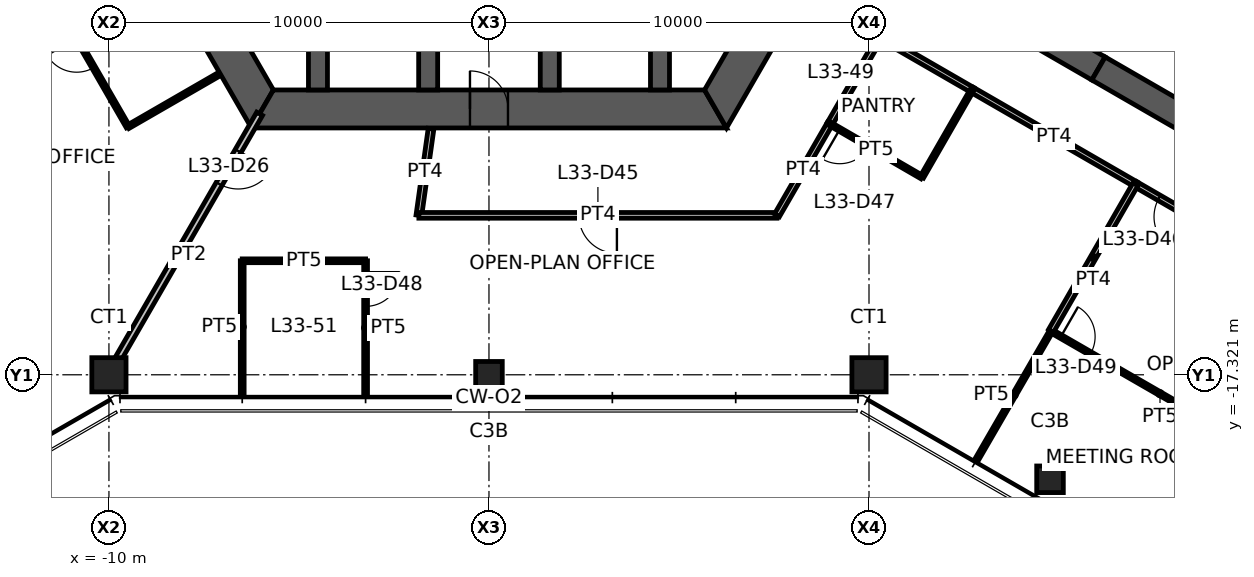
"""IFC4 building model, lengths in metres.
Left out: names, types, materials, properties, quantities, classifications, styles, units other than length and angle.
Written with IfcOpenShell. Run it as: python <this file> out.ifc"""

import sys

from ifc_helpers import new_model, si_unit, direction, frame, frame_2d, origin, origin_2d, place, context, subcontext, project, spatial, polyline, rectangle, hollow_rectangle, outline, extrude, element, fill, save


model = new_model("IFC4")
c1 = context("Model", 3, precision=1e-05, world=origin(), true_north=direction((0.0, 1.0)))
c2 = subcontext(c1, "Body", "Model", "MODEL_VIEW")
j1 = project(units=[si_unit("LENGTHUNIT", "METRE"), si_unit("PLANEANGLEUNIT", "RADIAN")], contexts=[c1])
p1 = place(None, origin())
s1 = spatial("IfcSite", under=j1, at=p1, CompositionType="ELEMENT")
p2 = place(p1, origin())
s2 = spatial("IfcBuilding", under=s1, at=p2, CompositionType="ELEMENT")
p3 = place(p2, frame((0.0, 0.0, 133.1)))
s3 = spatial("IfcBuildingStorey", under=s2, at=p3, CompositionType="ELEMENT", Elevation=133.1)
for number, where, z_axis, x_axis in (
    (1, (-10.0, -17.321, 0.0), (0.0, 0.0, 1.0), (1.0, 0.0, 0.0)),
    (2, (10.0, -17.321, 0.0), (0.0, 0.0, 1.0), (1.0, 0.0, 0.0)),
):
    element("IfcColumn", number, at=place(p3, frame(where, z_axis=z_axis, x_axis=x_axis)), inside=s3, PredefinedType="COLUMN", context=c2, shape_type="SweptSolid", body=[
        extrude(hollow_rectangle(XDim=0.9, YDim=0.9, WallThickness=0.07, at=origin_2d()), origin(), (0.0, 0.0, 1.0), 3.9),
    ])
for number, where, z_axis, x_axis in (
    (3, (0.0, -17.321, 0.0), (0.0, 0.0, 1.0), (1.0, 0.0, 0.0)),
    (4, (14.763, -20.071, 0.0), (0.0, 0.0, 1.0), (1.0, 0.0, 0.0)),
):
    element("IfcColumn", number, at=place(p3, frame(where, z_axis=z_axis, x_axis=x_axis)), inside=s3, PredefinedType="COLUMN", context=c2, shape_type="SweptSolid", body=[
        extrude(hollow_rectangle(XDim=0.7, YDim=0.7, WallThickness=0.036, at=origin_2d()), origin(), (0.0, 0.0, 1.0), 3.9),
    ])
p4 = place(p3, frame((-11.922, 0.0, 0.0), z_axis=(0.0, 0.0, 1.0), x_axis=(0.500004296715, -0.866022923061, 0.0)))
e5 = element("IfcWall", 5, at=p4, inside=s3, PredefinedType="SHEAR", context=c2, shape_type="SweptSolid", body=[
    extrude(outline(polyline([(-0.289, -0.5), (6.331, -0.5), (7.131, -0.5), (12.211, -0.5), (11.634, 0.5), (7.131, 0.5), (6.331, 0.5), (0.289, 0.5), (-0.289, -0.5)])), origin(), (0.0, 0.0, 1.0), 3.9),
])
p5 = place(p4, frame((6.331, 0.0, 0.0)))
e6 = element("IfcOpeningElement", 6, at=p5, cuts=e5, PredefinedType="OPENING", context=c2, shape_type="SweptSolid", body=[
    extrude(rectangle(XDim=0.8, YDim=2.1, at=frame_2d((0.4, 1.05))), frame((0.0, 0.51, 0.0), z_axis=(0.0, -1.0, 0.0), x_axis=(1.0, 0.0, 0.0)), (0.0, 0.0, 1.0), 1.02),
])
p6 = place(p3, frame((-5.961, -10.325, 0.0), z_axis=(0.0, 0.0, 1.0), x_axis=(1.0, 0.0, 0.0)))
e7 = element("IfcWall", 7, at=p6, inside=s3, PredefinedType="SHEAR", context=c2, shape_type="SweptSolid", body=[
    extrude(outline(polyline([(-0.289, -0.5), (5.461, -0.5), (6.461, -0.5), (12.211, -0.5), (11.634, 0.5), (6.461, 0.5), (5.461, 0.5), (0.289, 0.5), (-0.289, -0.5)])), origin(), (0.0, 0.0, 1.0), 3.9),
])
p7 = place(p6, frame((5.461, 0.0, 0.0)))
e8 = element("IfcOpeningElement", 8, at=p7, cuts=e7, PredefinedType="OPENING", context=c2, shape_type="SweptSolid", body=[
    extrude(rectangle(XDim=1.0, YDim=2.1, at=frame_2d((0.5, 1.05))), frame((0.0, 0.51, 0.0), z_axis=(0.0, -1.0, 0.0), x_axis=(1.0, 0.0, 0.0)), (0.0, 0.0, 1.0), 1.02),
])
p8 = place(p3, frame((5.961, -10.325, 0.0), z_axis=(0.0, 0.0, 1.0), x_axis=(0.500004296715, 0.866022923061, 0.0)))
e9 = element("IfcWall", 9, at=p8, inside=s3, PredefinedType="SHEAR", context=c2, shape_type="SweptSolid", body=[
    extrude(outline(polyline([(-0.289, -0.5), (4.594, -0.5), (5.394, -0.5), (12.211, -0.5), (11.634, 0.5), (5.394, 0.5), (4.594, 0.5), (0.289, 0.5), (-0.289, -0.5)])), origin(), (0.0, 0.0, 1.0), 3.9),
])
p9 = place(p8, frame((4.594, 0.0, 0.0)))
e10 = element("IfcOpeningElement", 10, at=p9, cuts=e9, PredefinedType="OPENING", context=c2, shape_type="SweptSolid", body=[
    extrude(rectangle(XDim=0.8, YDim=2.1, at=frame_2d((0.4, 1.05))), frame((0.0, 0.51, 0.0), z_axis=(0.0, -1.0, 0.0), x_axis=(1.0, 0.0, 0.0)), (0.0, 0.0, 1.0), 1.02),
])
p10 = place(p3, frame((-9.375, -5.413, 0.0), z_axis=(0.0, 0.0, 1.0), x_axis=(-0.866032377459, -0.499987921047, 0.0)))
e11 = element("IfcWall", 11, at=p10, inside=s3, PredefinedType="SHEAR", context=c2, shape_type="SweptSolid", body=[
    extrude(rectangle(XDim=7.696, YDim=0.7, at=frame_2d((3.848, 0.0))), origin(), (0.0, 0.0, 1.0), 3.9),
])
p11 = place(p10, frame((0.9, 0.0, 0.0)))
e12 = element("IfcOpeningElement", 12, at=p11, cuts=e11, PredefinedType="OPENING", context=c2, shape_type="SweptSolid", body=[
    extrude(rectangle(XDim=1.0, YDim=2.1, at=frame_2d((0.5, 1.05))), frame((0.0, 0.36, 0.0), z_axis=(0.0, -1.0, 0.0), x_axis=(1.0, 0.0, 0.0)), (0.0, 0.0, 1.0), 0.72),
])
p12 = place(p3, frame((9.375, -5.413, 0.0), z_axis=(0.0, 0.0, 1.0), x_axis=(0.866032377459, -0.499987921047, 0.0)))
e13 = element("IfcWall", 13, at=p12, inside=s3, PredefinedType="SHEAR", context=c2, shape_type="SweptSolid", body=[
    extrude(rectangle(XDim=7.696, YDim=0.7, at=frame_2d((3.848, 0.0))), origin(), (0.0, 0.0, 1.0), 3.9),
])
p13 = place(p12, frame((0.9, 0.0, 0.0)))
e14 = element("IfcOpeningElement", 14, at=p13, cuts=e13, PredefinedType="OPENING", context=c2, shape_type="SweptSolid", body=[
    extrude(rectangle(XDim=1.0, YDim=2.1, at=frame_2d((0.5, 1.05))), frame((0.0, 0.36, 0.0), z_axis=(0.0, -1.0, 0.0), x_axis=(1.0, 0.0, 0.0)), (0.0, 0.0, 1.0), 0.72),
])
p14 = place(p3, frame((16.039, -9.26, 0.0), z_axis=(0.0, 0.0, 1.0), x_axis=(0.866024837091, -0.50000098154, 0.0)))
e15 = element("IfcWall", 15, at=p14, inside=s3, PredefinedType="SHEAR", context=c2, shape_type="SweptSolid", body=[
    extrude(rectangle(XDim=13.0, YDim=0.7, at=frame_2d((6.5, 0.0))), origin(), (0.0, 0.0, 1.0), 3.9),
])
p15 = place(p3, frame((-1.6, -3.85, 0.0), z_axis=(0.0, 0.0, 1.0), x_axis=(0.0, -1.0, 0.0)))
e16 = element("IfcWall", 16, at=p15, inside=s3, PredefinedType="SHEAR", context=c2, shape_type="SweptSolid", body=[
    extrude(rectangle(XDim=5.975, YDim=0.5, at=frame_2d((2.987, 0.0))), origin(), (0.0, 0.0, 1.0), 3.9),
])
p16 = place(p15, frame((3.7, 0.0, 0.0)))
e17 = element("IfcOpeningElement", 17, at=p16, cuts=e16, PredefinedType="OPENING", context=c2, shape_type="SweptSolid", body=[
    extrude(rectangle(XDim=0.9, YDim=2.1, at=frame_2d((0.45, 1.05))), frame((0.0, 0.26, 0.0), z_axis=(0.0, -1.0, 0.0), x_axis=(1.0, 0.0, 0.0)), (0.0, 0.0, 1.0), 0.52),
])
p17 = place(p3, frame((1.6, -3.85, 0.0), z_axis=(0.0, 0.0, 1.0), x_axis=(0.0, -1.0, 0.0)))
e18 = element("IfcWall", 18, at=p17, inside=s3, PredefinedType="SHEAR", context=c2, shape_type="SweptSolid", body=[
    extrude(rectangle(XDim=5.975, YDim=0.5, at=frame_2d((2.987, 0.0))), origin(), (0.0, 0.0, 1.0), 3.9),
])
p18 = place(p17, frame((3.55, 0.0, 0.0)))
e19 = element("IfcOpeningElement", 19, at=p18, cuts=e18, PredefinedType="OPENING", context=c2, shape_type="SweptSolid", body=[
    extrude(rectangle(XDim=1.2, YDim=2.1, at=frame_2d((0.6, 1.05))), frame((0.0, 0.26, 0.0), z_axis=(0.0, -1.0, 0.0), x_axis=(1.0, 0.0, 0.0)), (0.0, 0.0, 1.0), 0.52),
])
for number, where, z_axis, x_axis in (
    (20, (-4.5, -3.85, 0.0), (0.0, 0.0, 1.0), (0.0, -1.0, 0.0)),
    (21, (4.5, -3.85, 0.0), (0.0, 0.0, 1.0), (0.0, -1.0, 0.0)),
):
    element("IfcWall", number, at=place(p3, frame(where, z_axis=z_axis, x_axis=x_axis)), inside=s3, PredefinedType="SHEAR", context=c2, shape_type="SweptSolid", body=[
        extrude(rectangle(XDim=5.975, YDim=0.5, at=frame_2d((2.987, 0.0))), origin(), (0.0, 0.0, 1.0), 3.9),
    ])
p19 = place(p3, frame((-6.035, -10.453, 0.0), z_axis=(0.0, 0.0, 1.0), x_axis=(-0.499989830942, -0.866031274813, 0.0)))
e22 = element("IfcWall", 22, at=p19, inside=s3, PredefinedType="PARTITIONING", context=c2, shape_type="SweptSolid", body=[
    extrude(rectangle(XDim=7.93, YDim=0.175, at=frame_2d((3.965, 0.0))), origin(), (0.0, 0.0, 1.0), 3.05),
])
p20 = place(p19, frame((1.13, 0.0, 0.0)))
e23 = element("IfcOpeningElement", 23, at=p20, cuts=e22, PredefinedType="OPENING", context=c2, shape_type="SweptSolid", body=[
    extrude(rectangle(XDim=1.0, YDim=2.1, at=frame_2d((0.5, 1.05))), frame((0.0, 0.098, 0.0), z_axis=(0.0, -1.0, 0.0), x_axis=(1.0, 0.0, 0.0)), (0.0, 0.0, 1.0), 0.195),
])
p21 = place(p3, frame((-9.5, -10.796, 0.0), z_axis=(0.0, 0.0, 1.0), x_axis=(-0.499990139034, 0.866031096941, 0.0)))
e24 = element("IfcWall", 24, at=p21, inside=s3, PredefinedType="PARTITIONING", context=c2, shape_type="SweptSolid", body=[
    extrude(rectangle(XDim=3.0, YDim=0.1, at=frame_2d((1.5, 0.0))), origin(), (0.0, 0.0, 1.0), 2.95),
])
p22 = place(p21, frame((1.8, 0.0, 0.0)))
e25 = element("IfcOpeningElement", 25, at=p22, cuts=e24, PredefinedType="OPENING", context=c2, shape_type="SweptSolid", body=[
    extrude(rectangle(XDim=0.9, YDim=2.1, at=frame_2d((0.45, 1.05))), frame((0.0, 0.06, 0.0), z_axis=(0.0, -1.0, 0.0), x_axis=(1.0, 0.0, 0.0)), (0.0, 0.0, 1.0), 0.12),
])
p23 = place(p3, frame((-7.092, -9.406, 0.0), z_axis=(0.0, 0.0, 1.0), x_axis=(-0.86603494908, -0.499983466698, 0.0)))
e26 = element("IfcWall", 26, at=p23, inside=s3, PredefinedType="PARTITIONING", context=c2, shape_type="SweptSolid", body=[
    extrude(rectangle(XDim=2.78, YDim=0.1, at=frame_2d((1.39, 0.0))), origin(), (0.0, 0.0, 1.0), 2.95),
])
p24 = place(p3, frame((10.292, -8.425, 0.0), z_axis=(0.0, 0.0, 1.0), x_axis=(-0.499966561876, -0.866044708433, 0.0)))
e27 = element("IfcWall", 27, at=p24, inside=s3, PredefinedType="PARTITIONING", context=c2, shape_type="SweptSolid", body=[
    extrude(rectangle(XDim=2.655, YDim=0.15, at=frame_2d((1.328, 0.0))), origin(), (0.0, 0.0, 1.0), 2.95),
])
p25 = place(p3, frame((12.721, -9.827, 0.0), z_axis=(0.0, 0.0, 1.0), x_axis=(-0.866049342339, 0.499958534914, 0.0)))
e28 = element("IfcWall", 28, at=p25, inside=s3, PredefinedType="PARTITIONING", context=c2, shape_type="SweptSolid", body=[
    extrude(rectangle(XDim=2.805, YDim=0.15, at=frame_2d((1.402, 0.0))), origin(), (0.0, 0.0, 1.0), 2.95),
])
p26 = place(p3, frame((-1.844, -13.125, 0.0), z_axis=(0.0, 0.0, 1.0), x_axis=(0.139119980631, 0.990275532864, 0.0)))
e29 = element("IfcWall", 29, at=p26, inside=s3, PredefinedType="PARTITIONING", context=c2, shape_type="SweptSolid", body=[
    extrude(rectangle(XDim=2.302, YDim=0.15, at=frame_2d((1.151, 0.0))), origin(), (0.0, 0.0, 1.0), 2.95),
])
p27 = place(p3, frame((7.578, -13.125, 0.0), z_axis=(0.0, 0.0, 1.0), x_axis=(-1.0, 0.0, 0.0)))
e30 = element("IfcWall", 30, at=p27, inside=s3, PredefinedType="PARTITIONING", context=c2, shape_type="SweptSolid", body=[
    extrude(rectangle(XDim=9.422, YDim=0.15, at=frame_2d((4.711, 0.0))), origin(), (0.0, 0.0, 1.0), 2.95),
])
p28 = place(p27, frame((4.211, 0.0, 0.0)))
e31 = element("IfcOpeningElement", 31, at=p28, cuts=e30, PredefinedType="OPENING", context=c2, shape_type="SweptSolid", body=[
    extrude(rectangle(XDim=1.0, YDim=2.1, at=frame_2d((0.5, 1.05))), frame((0.0, 0.085, 0.0), z_axis=(0.0, -1.0, 0.0), x_axis=(1.0, 0.0, 0.0)), (0.0, 0.0, 1.0), 0.17),
])
p29 = place(p3, frame((8.969, -10.716, 0.0), z_axis=(0.0, 0.0, 1.0), x_axis=(-0.500008568482, -0.866020456713, 0.0)))
e32 = element("IfcWall", 32, at=p29, inside=s3, PredefinedType="PARTITIONING", context=c2, shape_type="SweptSolid", body=[
    extrude(rectangle(XDim=2.782, YDim=0.15, at=frame_2d((1.391, 0.0))), origin(), (0.0, 0.0, 1.0), 2.95),
])
p30 = place(p3, frame((17.021, -12.31, 0.0), z_axis=(0.0, 0.0, 1.0), x_axis=(-0.866018071205, 0.500012700186, 0.0)))
e33 = element("IfcWall", 33, at=p30, inside=s3, PredefinedType="PARTITIONING", context=c2, shape_type="SweptSolid", body=[
    extrude(rectangle(XDim=4.975, YDim=0.15, at=frame_2d((2.488, 0.0))), origin(), (0.0, 0.0, 1.0), 2.95),
])
p31 = place(p3, frame((19.121, -13.522, 0.0), z_axis=(0.0, 0.0, 1.0), x_axis=(-0.866000196749, 0.500043657324, 0.0)))
e34 = element("IfcWall", 34, at=p31, inside=s3, PredefinedType="PARTITIONING", context=c2, shape_type="SweptSolid", body=[
    extrude(rectangle(XDim=2.434, YDim=0.15, at=frame_2d((1.217, 0.0))), origin(), (0.0, 0.0, 1.0), 2.95),
])
p32 = place(p31, frame((0.717, 0.0, 0.0)))
e35 = element("IfcOpeningElement", 35, at=p32, cuts=e34, PredefinedType="OPENING", context=c2, shape_type="SweptSolid", body=[
    extrude(rectangle(XDim=1.0, YDim=2.1, at=frame_2d((0.5, 1.05))), frame((0.0, 0.085, 0.0), z_axis=(0.0, -1.0, 0.0), x_axis=(1.0, 0.0, 0.0)), (0.0, 0.0, 1.0), 0.17),
])
p33 = place(p3, frame((11.392, -12.119, 0.0), z_axis=(0.0, 0.0, 1.0), x_axis=(-0.865255114713, 0.501331812737, 0.0)))
e36 = element("IfcWall", 36, at=p33, inside=s3, PredefinedType="PARTITIONING", context=c2, shape_type="SweptSolid", body=[
    extrude(rectangle(XDim=2.8, YDim=0.1, at=frame_2d((1.4, 0.0))), origin(), (0.0, 0.0, 1.0), 2.95),
])
p34 = place(p33, frame((1.6, 0.0, 0.0)))
e37 = element("IfcOpeningElement", 37, at=p34, cuts=e36, PredefinedType="OPENING", context=c2, shape_type="SweptSolid", body=[
    extrude(rectangle(XDim=0.9, YDim=2.1, at=frame_2d((0.45, 1.05))), frame((0.0, 0.06, 0.0), z_axis=(0.0, -1.0, 0.0), x_axis=(1.0, 0.0, 0.0)), (0.0, 0.0, 1.0), 0.12),
])
p35 = place(p3, frame((12.713, -9.822, 0.0), z_axis=(0.0, 0.0, 1.0), x_axis=(-0.49852824611, -0.866873455488, 0.0)))
e38 = element("IfcWall", 38, at=p35, inside=s3, PredefinedType="PARTITIONING", context=c2, shape_type="SweptSolid", body=[
    extrude(rectangle(XDim=2.65, YDim=0.1, at=frame_2d((1.325, 0.0))), origin(), (0.0, 0.0, 1.0), 2.95),
])
p36 = place(p3, frame((-6.493, -17.801, 0.0), z_axis=(0.0, 0.0, 1.0), x_axis=(0.0, 1.0, 0.0)))
e39 = element("IfcWall", 39, at=p36, inside=s3, PredefinedType="PARTITIONING", context=c2, shape_type="SweptSolid", body=[
    extrude(rectangle(XDim=3.48, YDim=0.1, at=frame_2d((1.74, 0.0))), origin(), (0.0, 0.0, 1.0), 2.95),
])
p37 = place(p3, frame((-6.493, -14.321, 0.0), z_axis=(0.0, 0.0, 1.0), x_axis=(1.0, 0.0, 0.0)))
e40 = element("IfcWall", 40, at=p37, inside=s3, PredefinedType="PARTITIONING", context=c2, shape_type="SweptSolid", body=[
    extrude(rectangle(XDim=3.247, YDim=0.1, at=frame_2d((1.623, 0.0))), origin(), (0.0, 0.0, 1.0), 2.95),
])
p38 = place(p3, frame((-3.246, -14.321, 0.0), z_axis=(0.0, 0.0, 1.0), x_axis=(0.0, -1.0, 0.0)))
e41 = element("IfcWall", 41, at=p38, inside=s3, PredefinedType="PARTITIONING", context=c2, shape_type="SweptSolid", body=[
    extrude(rectangle(XDim=3.53, YDim=0.1, at=frame_2d((1.765, 0.0))), origin(), (0.0, 0.0, 1.0), 2.95),
])
p39 = place(p38, frame((0.3, 0.0, 0.0)))
e42 = element("IfcOpeningElement", 42, at=p39, cuts=e41, PredefinedType="OPENING", context=c2, shape_type="SweptSolid", body=[
    extrude(rectangle(XDim=0.9, YDim=2.1, at=frame_2d((0.45, 1.05))), frame((0.0, 0.06, 0.0), z_axis=(0.0, -1.0, 0.0), x_axis=(1.0, 0.0, 0.0)), (0.0, 0.0, 1.0), 0.12),
])
p40 = place(p3, frame((12.84, -19.543, 0.0), z_axis=(0.0, 0.0, 1.0), x_axis=(0.501092951989, 0.865393467428, 0.0)))
e43 = element("IfcWall", 43, at=p40, inside=s3, PredefinedType="PARTITIONING", context=c2, shape_type="SweptSolid", body=[
    extrude(rectangle(XDim=3.905, YDim=0.1, at=frame_2d((1.953, 0.0))), origin(), (0.0, 0.0, 1.0), 2.95),
])
p41 = place(p3, frame((14.79, -16.165, 0.0), z_axis=(0.0, 0.0, 1.0), x_axis=(0.866359914703, -0.499420161984, 0.0)))
e44 = element("IfcWall", 44, at=p41, inside=s3, PredefinedType="PARTITIONING", context=c2, shape_type="SweptSolid", body=[
    extrude(rectangle(XDim=6.619, YDim=0.1, at=frame_2d((3.31, 0.0))), origin(), (0.0, 0.0, 1.0), 2.95),
])
p42 = place(p41, frame((0.3, 0.0, 0.0)))
e45 = element("IfcOpeningElement", 45, at=p42, cuts=e44, PredefinedType="OPENING", context=c2, shape_type="SweptSolid", body=[
    extrude(rectangle(XDim=0.9, YDim=2.1, at=frame_2d((0.45, 1.05))), frame((0.0, 0.06, 0.0), z_axis=(0.0, -1.0, 0.0), x_axis=(1.0, 0.0, 0.0)), (0.0, 0.0, 1.0), 0.12),
])
p43 = place(p3, frame((17.013, -12.305, 0.0), z_axis=(0.0, 0.0, 1.0), x_axis=(-0.499081704511, -0.866554933182, 0.0)))
e46 = element("IfcWall", 46, at=p43, inside=s3, PredefinedType="PARTITIONING", context=c2, shape_type="SweptSolid", body=[
    extrude(rectangle(XDim=4.454, YDim=0.15, at=frame_2d((2.227, 0.0))), origin(), (0.0, 0.0, 1.0), 2.95),
])
p44 = place(p7, origin())
e47 = element("IfcDoor", 47, at=p44, inside=s3, OperationType="SINGLE_SWING_LEFT", PredefinedType="DOOR", context=c2, shape_type="SweptSolid", body=[
    extrude(rectangle(XDim=1.0, YDim=2.1, at=frame_2d((0.5, 1.05))), frame((0.0, 0.025, 0.0), z_axis=(0.0, -1.0, 0.0), x_axis=(1.0, 0.0, 0.0)), (0.0, 0.0, 1.0), 0.05),
])
fill(e8, e47)
p45 = place(p20, origin())
e48 = element("IfcDoor", 48, at=p45, inside=s3, OperationType="SINGLE_SWING_LEFT", PredefinedType="DOOR", context=c2, shape_type="SweptSolid", body=[
    extrude(rectangle(XDim=1.0, YDim=2.1, at=frame_2d((0.5, 1.05))), frame((0.0, 0.025, 0.0), z_axis=(0.0, -1.0, 0.0), x_axis=(1.0, 0.0, 0.0)), (0.0, 0.0, 1.0), 0.05),
])
fill(e23, e48)
p46 = place(p22, origin())
e49 = element("IfcDoor", 49, at=p46, inside=s3, OperationType="SINGLE_SWING_RIGHT", PredefinedType="DOOR", context=c2, shape_type="SweptSolid", body=[
    extrude(rectangle(XDim=0.9, YDim=2.1, at=frame_2d((0.45, 1.05))), frame((0.0, 0.025, 0.0), z_axis=(0.0, -1.0, 0.0), x_axis=(1.0, 0.0, 0.0)), (0.0, 0.0, 1.0), 0.05),
])
fill(e25, e49)
p47 = place(p28, origin())
e50 = element("IfcDoor", 50, at=p47, inside=s3, OperationType="SINGLE_SWING_LEFT", PredefinedType="DOOR", context=c2, shape_type="SweptSolid", body=[
    extrude(rectangle(XDim=1.0, YDim=2.1, at=frame_2d((0.5, 1.05))), frame((0.0, 0.025, 0.0), z_axis=(0.0, -1.0, 0.0), x_axis=(1.0, 0.0, 0.0)), (0.0, 0.0, 1.0), 0.05),
])
fill(e31, e50)
p48 = place(p32, origin())
e51 = element("IfcDoor", 51, at=p48, inside=s3, OperationType="SINGLE_SWING_LEFT", PredefinedType="DOOR", context=c2, shape_type="SweptSolid", body=[
    extrude(rectangle(XDim=1.0, YDim=2.1, at=frame_2d((0.5, 1.05))), frame((0.0, 0.025, 0.0), z_axis=(0.0, -1.0, 0.0), x_axis=(1.0, 0.0, 0.0)), (0.0, 0.0, 1.0), 0.05),
])
fill(e35, e51)
p49 = place(p34, origin())
e52 = element("IfcDoor", 52, at=p49, inside=s3, OperationType="SINGLE_SWING_RIGHT", PredefinedType="DOOR", context=c2, shape_type="SweptSolid", body=[
    extrude(rectangle(XDim=0.9, YDim=2.1, at=frame_2d((0.45, 1.05))), frame((0.0, 0.025, 0.0), z_axis=(0.0, -1.0, 0.0), x_axis=(1.0, 0.0, 0.0)), (0.0, 0.0, 1.0), 0.05),
])
fill(e37, e52)
p50 = place(p39, origin())
e53 = element("IfcDoor", 53, at=p50, inside=s3, OperationType="SINGLE_SWING_LEFT", PredefinedType="DOOR", context=c2, shape_type="SweptSolid", body=[
    extrude(rectangle(XDim=0.9, YDim=2.1, at=frame_2d((0.45, 1.05))), frame((0.0, 0.025, 0.0), z_axis=(0.0, -1.0, 0.0), x_axis=(1.0, 0.0, 0.0)), (0.0, 0.0, 1.0), 0.05),
])
fill(e42, e53)
p51 = place(p42, origin())
e54 = element("IfcDoor", 54, at=p51, inside=s3, OperationType="SINGLE_SWING_LEFT", PredefinedType="DOOR", context=c2, shape_type="SweptSolid", body=[
    extrude(rectangle(XDim=0.9, YDim=2.1, at=frame_2d((0.45, 1.05))), frame((0.0, 0.025, 0.0), z_axis=(0.0, -1.0, 0.0), x_axis=(1.0, 0.0, 0.0)), (0.0, 0.0, 1.0), 0.05),
])
fill(e45, e54)
save(model, sys.argv[1])
